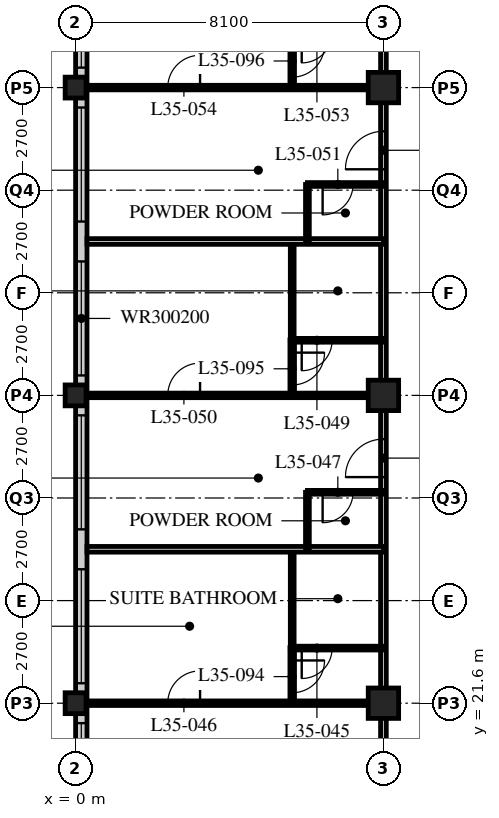
"""IFC4 building model, lengths in metres.
Left out: names, types, materials, properties, quantities, classifications, styles, units other than length and angle.
Written with IfcOpenShell. Run it as: python <this file> out.ifc"""

import sys

from ifc_helpers import new_model, si_unit, direction, frame, frame_2d, origin, origin_2d, place, context, subcontext, project, spatial, rectangle, hollow_rectangle, extrude, element, fill, save


model = new_model("IFC4")
c1 = context("Model", 3, precision=1e-05, world=origin(), true_north=direction((0.0, 1.0)))
c2 = subcontext(c1, "Body", "Model", "MODEL_VIEW")
j1 = project(units=[si_unit("LENGTHUNIT", "METRE"), si_unit("PLANEANGLEUNIT", "RADIAN")], contexts=[c1])
p1 = place(None, origin())
s1 = spatial("IfcSite", under=j1, at=p1, CompositionType="ELEMENT")
p2 = place(p1, origin())
s2 = spatial("IfcBuilding", under=s1, at=p2, CompositionType="ELEMENT")
p3 = place(p2, frame((0.0, 0.0, 137.4)))
s3 = spatial("IfcBuildingStorey", under=s2, at=p3, CompositionType="ELEMENT", Elevation=137.4)
for number, where, z_axis, x_axis in (
    (1, (0.0, 21.6, 0.0), (0.0, 0.0, 1.0), (1.0, 0.0, 0.0)),
    (2, (0.0, 29.7, 0.0), (0.0, 0.0, 1.0), (1.0, 0.0, 0.0)),
    (3, (0.0, 37.8, 0.0), (0.0, 0.0, 1.0), (1.0, 0.0, 0.0)),
):
    element("IfcColumn", number, at=place(p3, frame(where, z_axis=z_axis, x_axis=x_axis)), inside=s3, PredefinedType="COLUMN", context=c2, shape_type="SweptSolid", body=[
        extrude(hollow_rectangle(XDim=0.55, YDim=0.55, WallThickness=0.04, at=origin_2d()), origin(), (0.0, 0.0, 1.0), 3.4),
    ])
for number, where, z_axis, x_axis in (
    (4, (8.1, 21.6, 0.0), (0.0, 0.0, 1.0), (1.0, 0.0, 0.0)),
    (5, (8.1, 29.7, 0.0), (0.0, 0.0, 1.0), (1.0, 0.0, 0.0)),
    (6, (8.1, 37.8, 0.0), (0.0, 0.0, 1.0), (1.0, 0.0, 0.0)),
):
    element("IfcColumn", number, at=place(p3, frame(where, z_axis=z_axis, x_axis=x_axis)), inside=s3, PredefinedType="COLUMN", context=c2, shape_type="SweptSolid", body=[
        extrude(hollow_rectangle(XDim=0.8, YDim=0.8, WallThickness=0.08, at=origin_2d()), origin(), (0.0, 0.0, 1.0), 3.4),
    ])
p4 = place(p3, frame((0.15, 45.6, 0.0), z_axis=(0.0, 0.0, 1.0), x_axis=(0.0, -1.0, 0.0)))
e7 = element("IfcWall", 7, at=p4, inside=s3, PredefinedType="SOLIDWALL", context=c2, shape_type="SweptSolid", body=[
    extrude(rectangle(XDim=32.1, YDim=0.3, at=frame_2d((16.05, 0.0))), origin(), (0.0, 0.0, 1.0), 3.19),
])
p5 = place(p4, frame((0.225, 0.0, 0.9)))
e8 = element("IfcOpeningElement", 8, at=p5, cuts=e7, PredefinedType="OPENING", context=c2, shape_type="SweptSolid", body=[
    extrude(rectangle(XDim=3.0, YDim=2.0, at=frame_2d((1.5, 1.0))), frame((0.0, 0.16, 0.0), z_axis=(0.0, -1.0, 0.0), x_axis=(1.0, 0.0, 0.0)), (0.0, 0.0, 1.0), 0.32),
])
p6 = place(p4, frame((4.275, 0.0, 0.9)))
e9 = element("IfcOpeningElement", 9, at=p6, cuts=e7, PredefinedType="OPENING", context=c2, shape_type="SweptSolid", body=[
    extrude(rectangle(XDim=3.0, YDim=2.0, at=frame_2d((1.5, 1.0))), frame((0.0, 0.16, 0.0), z_axis=(0.0, -1.0, 0.0), x_axis=(1.0, 0.0, 0.0)), (0.0, 0.0, 1.0), 0.32),
])
p7 = place(p4, frame((8.325, 0.0, 0.9)))
e10 = element("IfcOpeningElement", 10, at=p7, cuts=e7, PredefinedType="OPENING", context=c2, shape_type="SweptSolid", body=[
    extrude(rectangle(XDim=3.0, YDim=2.0, at=frame_2d((1.5, 1.0))), frame((0.0, 0.16, 0.0), z_axis=(0.0, -1.0, 0.0), x_axis=(1.0, 0.0, 0.0)), (0.0, 0.0, 1.0), 0.32),
])
p8 = place(p4, frame((12.375, 0.0, 0.9)))
e11 = element("IfcOpeningElement", 11, at=p8, cuts=e7, PredefinedType="OPENING", context=c2, shape_type="SweptSolid", body=[
    extrude(rectangle(XDim=3.0, YDim=2.0, at=frame_2d((1.5, 1.0))), frame((0.0, 0.16, 0.0), z_axis=(0.0, -1.0, 0.0), x_axis=(1.0, 0.0, 0.0)), (0.0, 0.0, 1.0), 0.32),
])
p9 = place(p4, frame((16.425, 0.0, 0.9)))
e12 = element("IfcOpeningElement", 12, at=p9, cuts=e7, PredefinedType="OPENING", context=c2, shape_type="SweptSolid", body=[
    extrude(rectangle(XDim=3.0, YDim=2.0, at=frame_2d((1.5, 1.0))), frame((0.0, 0.16, 0.0), z_axis=(0.0, -1.0, 0.0), x_axis=(1.0, 0.0, 0.0)), (0.0, 0.0, 1.0), 0.32),
])
p10 = place(p4, frame((20.475, 0.0, 0.9)))
e13 = element("IfcOpeningElement", 13, at=p10, cuts=e7, PredefinedType="OPENING", context=c2, shape_type="SweptSolid", body=[
    extrude(rectangle(XDim=3.0, YDim=2.0, at=frame_2d((1.5, 1.0))), frame((0.0, 0.16, 0.0), z_axis=(0.0, -1.0, 0.0), x_axis=(1.0, 0.0, 0.0)), (0.0, 0.0, 1.0), 0.32),
])
p11 = place(p4, frame((24.525, 0.0, 0.9)))
e14 = element("IfcOpeningElement", 14, at=p11, cuts=e7, PredefinedType="OPENING", context=c2, shape_type="SweptSolid", body=[
    extrude(rectangle(XDim=3.0, YDim=2.0, at=frame_2d((1.5, 1.0))), frame((0.0, 0.16, 0.0), z_axis=(0.0, -1.0, 0.0), x_axis=(1.0, 0.0, 0.0)), (0.0, 0.0, 1.0), 0.32),
])
p12 = place(p4, frame((28.575, 0.0, 0.9)))
e15 = element("IfcOpeningElement", 15, at=p12, cuts=e7, PredefinedType="OPENING", context=c2, shape_type="SweptSolid", body=[
    extrude(rectangle(XDim=3.0, YDim=2.0, at=frame_2d((1.5, 1.0))), frame((0.0, 0.16, 0.0), z_axis=(0.0, -1.0, 0.0), x_axis=(1.0, 0.0, 0.0)), (0.0, 0.0, 1.0), 0.32),
])
p13 = place(p3, frame((8.1, 17.55, 0.0), z_axis=(0.0, 0.0, 1.0), x_axis=(0.0, 1.0, 0.0)))
e16 = element("IfcWall", 16, at=p13, inside=s3, PredefinedType="PARTITIONING", context=c2, shape_type="SweptSolid", body=[
    extrude(rectangle(XDim=28.35, YDim=0.15, at=frame_2d((14.175, 0.0))), origin(), (0.0, 0.0, 1.0), 2.578),
])
p14 = place(p13, frame((1.9, 0.0, 0.0)))
e17 = element("IfcOpeningElement", 17, at=p14, cuts=e16, PredefinedType="OPENING", context=c2, shape_type="SweptSolid", body=[
    extrude(rectangle(XDim=1.0, YDim=2.1, at=frame_2d((0.5, 1.05))), frame((0.0, 0.085, 0.0), z_axis=(0.0, -1.0, 0.0), x_axis=(1.0, 0.0, 0.0)), (0.0, 0.0, 1.0), 0.17),
])
p15 = place(p13, frame((10.0, 0.0, 0.0)))
e18 = element("IfcOpeningElement", 18, at=p15, cuts=e16, PredefinedType="OPENING", context=c2, shape_type="SweptSolid", body=[
    extrude(rectangle(XDim=1.0, YDim=2.1, at=frame_2d((0.5, 1.05))), frame((0.0, 0.085, 0.0), z_axis=(0.0, -1.0, 0.0), x_axis=(1.0, 0.0, 0.0)), (0.0, 0.0, 1.0), 0.17),
])
p16 = place(p13, frame((18.1, 0.0, 0.0)))
e19 = element("IfcOpeningElement", 19, at=p16, cuts=e16, PredefinedType="OPENING", context=c2, shape_type="SweptSolid", body=[
    extrude(rectangle(XDim=1.0, YDim=2.1, at=frame_2d((0.5, 1.05))), frame((0.0, 0.085, 0.0), z_axis=(0.0, -1.0, 0.0), x_axis=(1.0, 0.0, 0.0)), (0.0, 0.0, 1.0), 0.17),
])
p17 = place(p13, frame((24.9, 0.0, 0.0)))
e20 = element("IfcOpeningElement", 20, at=p17, cuts=e16, PredefinedType="OPENING", context=c2, shape_type="SweptSolid", body=[
    extrude(rectangle(XDim=1.0, YDim=2.1, at=frame_2d((0.5, 1.05))), frame((0.0, 0.085, 0.0), z_axis=(0.0, -1.0, 0.0), x_axis=(1.0, 0.0, 0.0)), (0.0, 0.0, 1.0), 0.17),
])
p18 = place(p3, frame((5.7, 23.05, 0.0), z_axis=(0.0, 0.0, 1.0), x_axis=(0.0, 1.0, 0.0)))
e21 = element("IfcWall", 21, at=p18, inside=s3, PredefinedType="PARTITIONING", context=c2, shape_type="SweptSolid", body=[
    extrude(rectangle(XDim=2.6, YDim=0.1, at=frame_2d((1.3, 0.0))), origin(), (0.0, 0.0, 1.0), 3.19),
])
p19 = place(p3, frame((8.1, 23.05, 0.0), z_axis=(0.0, 0.0, 1.0), x_axis=(-1.0, 0.0, 0.0)))
e22 = element("IfcWall", 22, at=p19, inside=s3, PredefinedType="PARTITIONING", context=c2, shape_type="SweptSolid", body=[
    extrude(rectangle(XDim=2.4, YDim=0.1, at=frame_2d((1.2, 0.0))), origin(), (0.0, 0.0, 1.0), 3.19),
])
p20 = place(p19, frame((1.35, 0.0, 0.0)))
e23 = element("IfcOpeningElement", 23, at=p20, cuts=e22, PredefinedType="OPENING", context=c2, shape_type="SweptSolid", body=[
    extrude(rectangle(XDim=0.8, YDim=2.1, at=frame_2d((0.4, 1.05))), frame((0.0, 0.06, 0.0), z_axis=(0.0, -1.0, 0.0), x_axis=(1.0, 0.0, 0.0)), (0.0, 0.0, 1.0), 0.12),
])
p21 = place(p3, frame((8.1, 21.6, 0.0), z_axis=(0.0, 0.0, 1.0), x_axis=(-1.0, 0.0, 0.0)))
e24 = element("IfcWall", 24, at=p21, inside=s3, PredefinedType="PARTITIONING", context=c2, shape_type="SweptSolid", body=[
    extrude(rectangle(XDim=7.8, YDim=0.12, at=frame_2d((3.9, 0.0))), origin(), (0.0, 0.0, 1.0), 2.578),
])
p22 = place(p21, frame((4.825, 0.0, 0.0)))
e25 = element("IfcOpeningElement", 25, at=p22, cuts=e24, PredefinedType="OPENING", context=c2, shape_type="SweptSolid", body=[
    extrude(rectangle(XDim=0.85, YDim=2.1, at=frame_2d((0.425, 1.05))), frame((0.0, 0.07, 0.0), z_axis=(0.0, -1.0, 0.0), x_axis=(1.0, 0.0, 0.0)), (0.0, 0.0, 1.0), 0.14),
])
p23 = place(p3, frame((8.1, 25.65, 0.0), z_axis=(0.0, 0.0, 1.0), x_axis=(-1.0, 0.0, 0.0)))
e26 = element("IfcWall", 26, at=p23, inside=s3, PredefinedType="PARTITIONING", context=c2, shape_type="SweptSolid", body=[
    extrude(rectangle(XDim=7.8, YDim=0.15, at=frame_2d((3.9, 0.0))), origin(), (0.0, 0.0, 1.0), 3.19),
])
p24 = place(p3, frame((6.1, 25.65, 0.0), z_axis=(0.0, 0.0, 1.0), x_axis=(0.0, 1.0, 0.0)))
e27 = element("IfcWall", 27, at=p24, inside=s3, PredefinedType="PARTITIONING", context=c2, shape_type="SweptSolid", body=[
    extrude(rectangle(XDim=1.5, YDim=0.1, at=frame_2d((0.75, 0.0))), origin(), (0.0, 0.0, 1.0), 3.19),
])
p25 = place(p3, frame((8.1, 27.15, 0.0), z_axis=(0.0, 0.0, 1.0), x_axis=(-1.0, 0.0, 0.0)))
e28 = element("IfcWall", 28, at=p25, inside=s3, PredefinedType="PARTITIONING", context=c2, shape_type="SweptSolid", body=[
    extrude(rectangle(XDim=2.0, YDim=0.1, at=frame_2d((1.0, 0.0))), origin(), (0.0, 0.0, 1.0), 3.19),
])
p26 = place(p25, frame((0.8, 0.0, 0.0)))
e29 = element("IfcOpeningElement", 29, at=p26, cuts=e28, PredefinedType="OPENING", context=c2, shape_type="SweptSolid", body=[
    extrude(rectangle(XDim=0.8, YDim=2.1, at=frame_2d((0.4, 1.05))), frame((0.0, 0.06, 0.0), z_axis=(0.0, -1.0, 0.0), x_axis=(1.0, 0.0, 0.0)), (0.0, 0.0, 1.0), 0.12),
])
p27 = place(p3, frame((5.7, 31.15, 0.0), z_axis=(0.0, 0.0, 1.0), x_axis=(0.0, 1.0, 0.0)))
e30 = element("IfcWall", 30, at=p27, inside=s3, PredefinedType="PARTITIONING", context=c2, shape_type="SweptSolid", body=[
    extrude(rectangle(XDim=2.6, YDim=0.1, at=frame_2d((1.3, 0.0))), origin(), (0.0, 0.0, 1.0), 3.19),
])
p28 = place(p3, frame((8.1, 31.15, 0.0), z_axis=(0.0, 0.0, 1.0), x_axis=(-1.0, 0.0, 0.0)))
e31 = element("IfcWall", 31, at=p28, inside=s3, PredefinedType="PARTITIONING", context=c2, shape_type="SweptSolid", body=[
    extrude(rectangle(XDim=2.4, YDim=0.1, at=frame_2d((1.2, 0.0))), origin(), (0.0, 0.0, 1.0), 3.19),
])
p29 = place(p28, frame((1.35, 0.0, 0.0)))
e32 = element("IfcOpeningElement", 32, at=p29, cuts=e31, PredefinedType="OPENING", context=c2, shape_type="SweptSolid", body=[
    extrude(rectangle(XDim=0.8, YDim=2.1, at=frame_2d((0.4, 1.05))), frame((0.0, 0.06, 0.0), z_axis=(0.0, -1.0, 0.0), x_axis=(1.0, 0.0, 0.0)), (0.0, 0.0, 1.0), 0.12),
])
p30 = place(p3, frame((8.1, 29.7, 0.0), z_axis=(0.0, 0.0, 1.0), x_axis=(-1.0, 0.0, 0.0)))
e33 = element("IfcWall", 33, at=p30, inside=s3, PredefinedType="PARTITIONING", context=c2, shape_type="SweptSolid", body=[
    extrude(rectangle(XDim=7.8, YDim=0.12, at=frame_2d((3.9, 0.0))), origin(), (0.0, 0.0, 1.0), 2.578),
])
p31 = place(p30, frame((4.825, 0.0, 0.0)))
e34 = element("IfcOpeningElement", 34, at=p31, cuts=e33, PredefinedType="OPENING", context=c2, shape_type="SweptSolid", body=[
    extrude(rectangle(XDim=0.85, YDim=2.1, at=frame_2d((0.425, 1.05))), frame((0.0, 0.07, 0.0), z_axis=(0.0, -1.0, 0.0), x_axis=(1.0, 0.0, 0.0)), (0.0, 0.0, 1.0), 0.14),
])
p32 = place(p3, frame((8.1, 33.75, 0.0), z_axis=(0.0, 0.0, 1.0), x_axis=(-1.0, 0.0, 0.0)))
e35 = element("IfcWall", 35, at=p32, inside=s3, PredefinedType="PARTITIONING", context=c2, shape_type="SweptSolid", body=[
    extrude(rectangle(XDim=7.8, YDim=0.15, at=frame_2d((3.9, 0.0))), origin(), (0.0, 0.0, 1.0), 3.19),
])
p33 = place(p3, frame((6.1, 33.75, 0.0), z_axis=(0.0, 0.0, 1.0), x_axis=(0.0, 1.0, 0.0)))
e36 = element("IfcWall", 36, at=p33, inside=s3, PredefinedType="PARTITIONING", context=c2, shape_type="SweptSolid", body=[
    extrude(rectangle(XDim=1.5, YDim=0.1, at=frame_2d((0.75, 0.0))), origin(), (0.0, 0.0, 1.0), 3.19),
])
p34 = place(p3, frame((8.1, 35.25, 0.0), z_axis=(0.0, 0.0, 1.0), x_axis=(-1.0, 0.0, 0.0)))
e37 = element("IfcWall", 37, at=p34, inside=s3, PredefinedType="PARTITIONING", context=c2, shape_type="SweptSolid", body=[
    extrude(rectangle(XDim=2.0, YDim=0.1, at=frame_2d((1.0, 0.0))), origin(), (0.0, 0.0, 1.0), 3.19),
])
p35 = place(p34, frame((0.8, 0.0, 0.0)))
e38 = element("IfcOpeningElement", 38, at=p35, cuts=e37, PredefinedType="OPENING", context=c2, shape_type="SweptSolid", body=[
    extrude(rectangle(XDim=0.8, YDim=2.1, at=frame_2d((0.4, 1.05))), frame((0.0, 0.06, 0.0), z_axis=(0.0, -1.0, 0.0), x_axis=(1.0, 0.0, 0.0)), (0.0, 0.0, 1.0), 0.12),
])
p36 = place(p3, frame((8.1, 37.8, 0.0), z_axis=(0.0, 0.0, 1.0), x_axis=(-1.0, 0.0, 0.0)))
e39 = element("IfcWall", 39, at=p36, inside=s3, PredefinedType="PARTITIONING", context=c2, shape_type="SweptSolid", body=[
    extrude(rectangle(XDim=7.8, YDim=0.12, at=frame_2d((3.9, 0.0))), origin(), (0.0, 0.0, 1.0), 2.578),
])
p37 = place(p36, frame((4.825, 0.0, 0.0)))
e40 = element("IfcOpeningElement", 40, at=p37, cuts=e39, PredefinedType="OPENING", context=c2, shape_type="SweptSolid", body=[
    extrude(rectangle(XDim=0.85, YDim=2.1, at=frame_2d((0.425, 1.05))), frame((0.0, 0.07, 0.0), z_axis=(0.0, -1.0, 0.0), x_axis=(1.0, 0.0, 0.0)), (0.0, 0.0, 1.0), 0.14),
])
p38 = place(p3, frame((5.7, 21.6, 0.0), z_axis=(0.0, 0.0, 1.0), x_axis=(0.0, 1.0, 0.0)))
e41 = element("IfcWall", 41, at=p38, inside=s3, PredefinedType="PARTITIONING", context=c2, shape_type="SweptSolid", body=[
    extrude(rectangle(XDim=1.46, YDim=0.12, at=frame_2d((0.73, 0.0))), origin(), (0.0, 0.0, 1.0), 3.19),
])
p39 = place(p38, frame((0.275, 0.0, 0.0)))
e42 = element("IfcOpeningElement", 42, at=p39, cuts=e41, PredefinedType="OPENING", context=c2, shape_type="SweptSolid", body=[
    extrude(rectangle(XDim=0.85, YDim=2.1, at=frame_2d((0.425, 1.05))), frame((0.0, 0.07, 0.0), z_axis=(0.0, -1.0, 0.0), x_axis=(1.0, 0.0, 0.0)), (0.0, 0.0, 1.0), 0.14),
])
p40 = place(p3, frame((5.7, 29.7, 0.0), z_axis=(0.0, 0.0, 1.0), x_axis=(0.0, 1.0, 0.0)))
e43 = element("IfcWall", 43, at=p40, inside=s3, PredefinedType="PARTITIONING", context=c2, shape_type="SweptSolid", body=[
    extrude(rectangle(XDim=1.46, YDim=0.12, at=frame_2d((0.73, 0.0))), origin(), (0.0, 0.0, 1.0), 3.19),
])
p41 = place(p40, frame((0.275, 0.0, 0.0)))
e44 = element("IfcOpeningElement", 44, at=p41, cuts=e43, PredefinedType="OPENING", context=c2, shape_type="SweptSolid", body=[
    extrude(rectangle(XDim=0.85, YDim=2.1, at=frame_2d((0.425, 1.05))), frame((0.0, 0.07, 0.0), z_axis=(0.0, -1.0, 0.0), x_axis=(1.0, 0.0, 0.0)), (0.0, 0.0, 1.0), 0.14),
])
p42 = place(p3, frame((5.7, 37.8, 0.0), z_axis=(0.0, 0.0, 1.0), x_axis=(0.0, 1.0, 0.0)))
e45 = element("IfcWall", 45, at=p42, inside=s3, PredefinedType="PARTITIONING", context=c2, shape_type="SweptSolid", body=[
    extrude(rectangle(XDim=1.46, YDim=0.12, at=frame_2d((0.73, 0.0))), origin(), (0.0, 0.0, 1.0), 3.19),
])
p43 = place(p42, frame((0.275, 0.0, 0.0)))
e46 = element("IfcOpeningElement", 46, at=p43, cuts=e45, PredefinedType="OPENING", context=c2, shape_type="SweptSolid", body=[
    extrude(rectangle(XDim=0.85, YDim=2.1, at=frame_2d((0.425, 1.05))), frame((0.0, 0.07, 0.0), z_axis=(0.0, -1.0, 0.0), x_axis=(1.0, 0.0, 0.0)), (0.0, 0.0, 1.0), 0.14),
])
p44 = place(p6, origin())
e47 = element("IfcWindow", 47, at=p44, inside=s3, PartitioningType="SINGLE_PANEL", PredefinedType="WINDOW", context=c2, shape_type="SweptSolid", body=[
    extrude(rectangle(XDim=3.0, YDim=2.0, at=frame_2d((1.5, 1.0))), frame((0.0, 0.03, 0.0), z_axis=(0.0, -1.0, 0.0), x_axis=(1.0, 0.0, 0.0)), (0.0, 0.0, 1.0), 0.06),
])
fill(e9, e47)
p45 = place(p7, origin())
e48 = element("IfcWindow", 48, at=p45, inside=s3, PartitioningType="SINGLE_PANEL", PredefinedType="WINDOW", context=c2, shape_type="SweptSolid", body=[
    extrude(rectangle(XDim=3.0, YDim=2.0, at=frame_2d((1.5, 1.0))), frame((0.0, 0.03, 0.0), z_axis=(0.0, -1.0, 0.0), x_axis=(1.0, 0.0, 0.0)), (0.0, 0.0, 1.0), 0.06),
])
fill(e10, e48)
p46 = place(p8, origin())
e49 = element("IfcWindow", 49, at=p46, inside=s3, PartitioningType="SINGLE_PANEL", PredefinedType="WINDOW", context=c2, shape_type="SweptSolid", body=[
    extrude(rectangle(XDim=3.0, YDim=2.0, at=frame_2d((1.5, 1.0))), frame((0.0, 0.03, 0.0), z_axis=(0.0, -1.0, 0.0), x_axis=(1.0, 0.0, 0.0)), (0.0, 0.0, 1.0), 0.06),
])
fill(e11, e49)
p47 = place(p9, origin())
e50 = element("IfcWindow", 50, at=p47, inside=s3, PartitioningType="SINGLE_PANEL", PredefinedType="WINDOW", context=c2, shape_type="SweptSolid", body=[
    extrude(rectangle(XDim=3.0, YDim=2.0, at=frame_2d((1.5, 1.0))), frame((0.0, 0.03, 0.0), z_axis=(0.0, -1.0, 0.0), x_axis=(1.0, 0.0, 0.0)), (0.0, 0.0, 1.0), 0.06),
])
fill(e12, e50)
p48 = place(p10, origin())
e51 = element("IfcWindow", 51, at=p48, inside=s3, PartitioningType="SINGLE_PANEL", PredefinedType="WINDOW", context=c2, shape_type="SweptSolid", body=[
    extrude(rectangle(XDim=3.0, YDim=2.0, at=frame_2d((1.5, 1.0))), frame((0.0, 0.03, 0.0), z_axis=(0.0, -1.0, 0.0), x_axis=(1.0, 0.0, 0.0)), (0.0, 0.0, 1.0), 0.06),
])
fill(e13, e51)
p49 = place(p11, origin())
e52 = element("IfcWindow", 52, at=p49, inside=s3, PartitioningType="SINGLE_PANEL", PredefinedType="WINDOW", context=c2, shape_type="SweptSolid", body=[
    extrude(rectangle(XDim=3.0, YDim=2.0, at=frame_2d((1.5, 1.0))), frame((0.0, 0.03, 0.0), z_axis=(0.0, -1.0, 0.0), x_axis=(1.0, 0.0, 0.0)), (0.0, 0.0, 1.0), 0.06),
])
fill(e14, e52)
p50 = place(p20, origin())
e53 = element("IfcDoor", 53, at=p50, inside=s3, OperationType="SINGLE_SWING_RIGHT", PredefinedType="DOOR", context=c2, shape_type="SweptSolid", body=[
    extrude(rectangle(XDim=0.8, YDim=2.1, at=frame_2d((0.4, 1.05))), frame((0.0, 0.025, 0.0), z_axis=(0.0, -1.0, 0.0), x_axis=(1.0, 0.0, 0.0)), (0.0, 0.0, 1.0), 0.05),
])
fill(e23, e53)
p51 = place(p22, origin())
e54 = element("IfcDoor", 54, at=p51, inside=s3, OperationType="SINGLE_SWING_RIGHT", PredefinedType="DOOR", context=c2, shape_type="SweptSolid", body=[
    extrude(rectangle(XDim=0.85, YDim=2.1, at=frame_2d((0.425, 1.05))), frame((0.0, 0.025, 0.0), z_axis=(0.0, -1.0, 0.0), x_axis=(1.0, 0.0, 0.0)), (0.0, 0.0, 1.0), 0.05),
])
fill(e25, e54)
p52 = place(p26, origin())
e55 = element("IfcDoor", 55, at=p52, inside=s3, OperationType="SINGLE_SWING_RIGHT", PredefinedType="DOOR", context=c2, shape_type="SweptSolid", body=[
    extrude(rectangle(XDim=0.8, YDim=2.1, at=frame_2d((0.4, 1.05))), frame((0.0, 0.025, 0.0), z_axis=(0.0, -1.0, 0.0), x_axis=(1.0, 0.0, 0.0)), (0.0, 0.0, 1.0), 0.05),
])
fill(e29, e55)
p53 = place(p15, origin())
e56 = element("IfcDoor", 56, at=p53, inside=s3, OperationType="SINGLE_SWING_LEFT", PredefinedType="DOOR", context=c2, shape_type="SweptSolid", body=[
    extrude(rectangle(XDim=1.0, YDim=2.1, at=frame_2d((0.5, 1.05))), frame((0.0, 0.025, 0.0), z_axis=(0.0, -1.0, 0.0), x_axis=(1.0, 0.0, 0.0)), (0.0, 0.0, 1.0), 0.05),
])
fill(e18, e56)
p54 = place(p29, origin())
e57 = element("IfcDoor", 57, at=p54, inside=s3, OperationType="SINGLE_SWING_RIGHT", PredefinedType="DOOR", context=c2, shape_type="SweptSolid", body=[
    extrude(rectangle(XDim=0.8, YDim=2.1, at=frame_2d((0.4, 1.05))), frame((0.0, 0.025, 0.0), z_axis=(0.0, -1.0, 0.0), x_axis=(1.0, 0.0, 0.0)), (0.0, 0.0, 1.0), 0.05),
])
fill(e32, e57)
p55 = place(p31, origin())
e58 = element("IfcDoor", 58, at=p55, inside=s3, OperationType="SINGLE_SWING_RIGHT", PredefinedType="DOOR", context=c2, shape_type="SweptSolid", body=[
    extrude(rectangle(XDim=0.85, YDim=2.1, at=frame_2d((0.425, 1.05))), frame((0.0, 0.025, 0.0), z_axis=(0.0, -1.0, 0.0), x_axis=(1.0, 0.0, 0.0)), (0.0, 0.0, 1.0), 0.05),
])
fill(e34, e58)
p56 = place(p35, origin())
e59 = element("IfcDoor", 59, at=p56, inside=s3, OperationType="SINGLE_SWING_RIGHT", PredefinedType="DOOR", context=c2, shape_type="SweptSolid", body=[
    extrude(rectangle(XDim=0.8, YDim=2.1, at=frame_2d((0.4, 1.05))), frame((0.0, 0.025, 0.0), z_axis=(0.0, -1.0, 0.0), x_axis=(1.0, 0.0, 0.0)), (0.0, 0.0, 1.0), 0.05),
])
fill(e38, e59)
p57 = place(p16, origin())
e60 = element("IfcDoor", 60, at=p57, inside=s3, OperationType="SINGLE_SWING_LEFT", PredefinedType="DOOR", context=c2, shape_type="SweptSolid", body=[
    extrude(rectangle(XDim=1.0, YDim=2.1, at=frame_2d((0.5, 1.05))), frame((0.0, 0.025, 0.0), z_axis=(0.0, -1.0, 0.0), x_axis=(1.0, 0.0, 0.0)), (0.0, 0.0, 1.0), 0.05),
])
fill(e19, e60)
p58 = place(p37, origin())
e61 = element("IfcDoor", 61, at=p58, inside=s3, OperationType="SINGLE_SWING_RIGHT", PredefinedType="DOOR", context=c2, shape_type="SweptSolid", body=[
    extrude(rectangle(XDim=0.85, YDim=2.1, at=frame_2d((0.425, 1.05))), frame((0.0, 0.025, 0.0), z_axis=(0.0, -1.0, 0.0), x_axis=(1.0, 0.0, 0.0)), (0.0, 0.0, 1.0), 0.05),
])
fill(e40, e61)
p59 = place(p39, origin())
e62 = element("IfcDoor", 62, at=p59, inside=s3, OperationType="SINGLE_SWING_LEFT", PredefinedType="DOOR", context=c2, shape_type="SweptSolid", body=[
    extrude(rectangle(XDim=0.85, YDim=2.1, at=frame_2d((0.425, 1.05))), frame((0.0, 0.025, 0.0), z_axis=(0.0, -1.0, 0.0), x_axis=(1.0, 0.0, 0.0)), (0.0, 0.0, 1.0), 0.05),
])
fill(e42, e62)
p60 = place(p41, origin())
e63 = element("IfcDoor", 63, at=p60, inside=s3, OperationType="SINGLE_SWING_LEFT", PredefinedType="DOOR", context=c2, shape_type="SweptSolid", body=[
    extrude(rectangle(XDim=0.85, YDim=2.1, at=frame_2d((0.425, 1.05))), frame((0.0, 0.025, 0.0), z_axis=(0.0, -1.0, 0.0), x_axis=(1.0, 0.0, 0.0)), (0.0, 0.0, 1.0), 0.05),
])
fill(e44, e63)
p61 = place(p43, origin())
e64 = element("IfcDoor", 64, at=p61, inside=s3, OperationType="SINGLE_SWING_LEFT", PredefinedType="DOOR", context=c2, shape_type="SweptSolid", body=[
    extrude(rectangle(XDim=0.85, YDim=2.1, at=frame_2d((0.425, 1.05))), frame((0.0, 0.025, 0.0), z_axis=(0.0, -1.0, 0.0), x_axis=(1.0, 0.0, 0.0)), (0.0, 0.0, 1.0), 0.05),
])
fill(e46, e64)
save(model, sys.argv[1])
